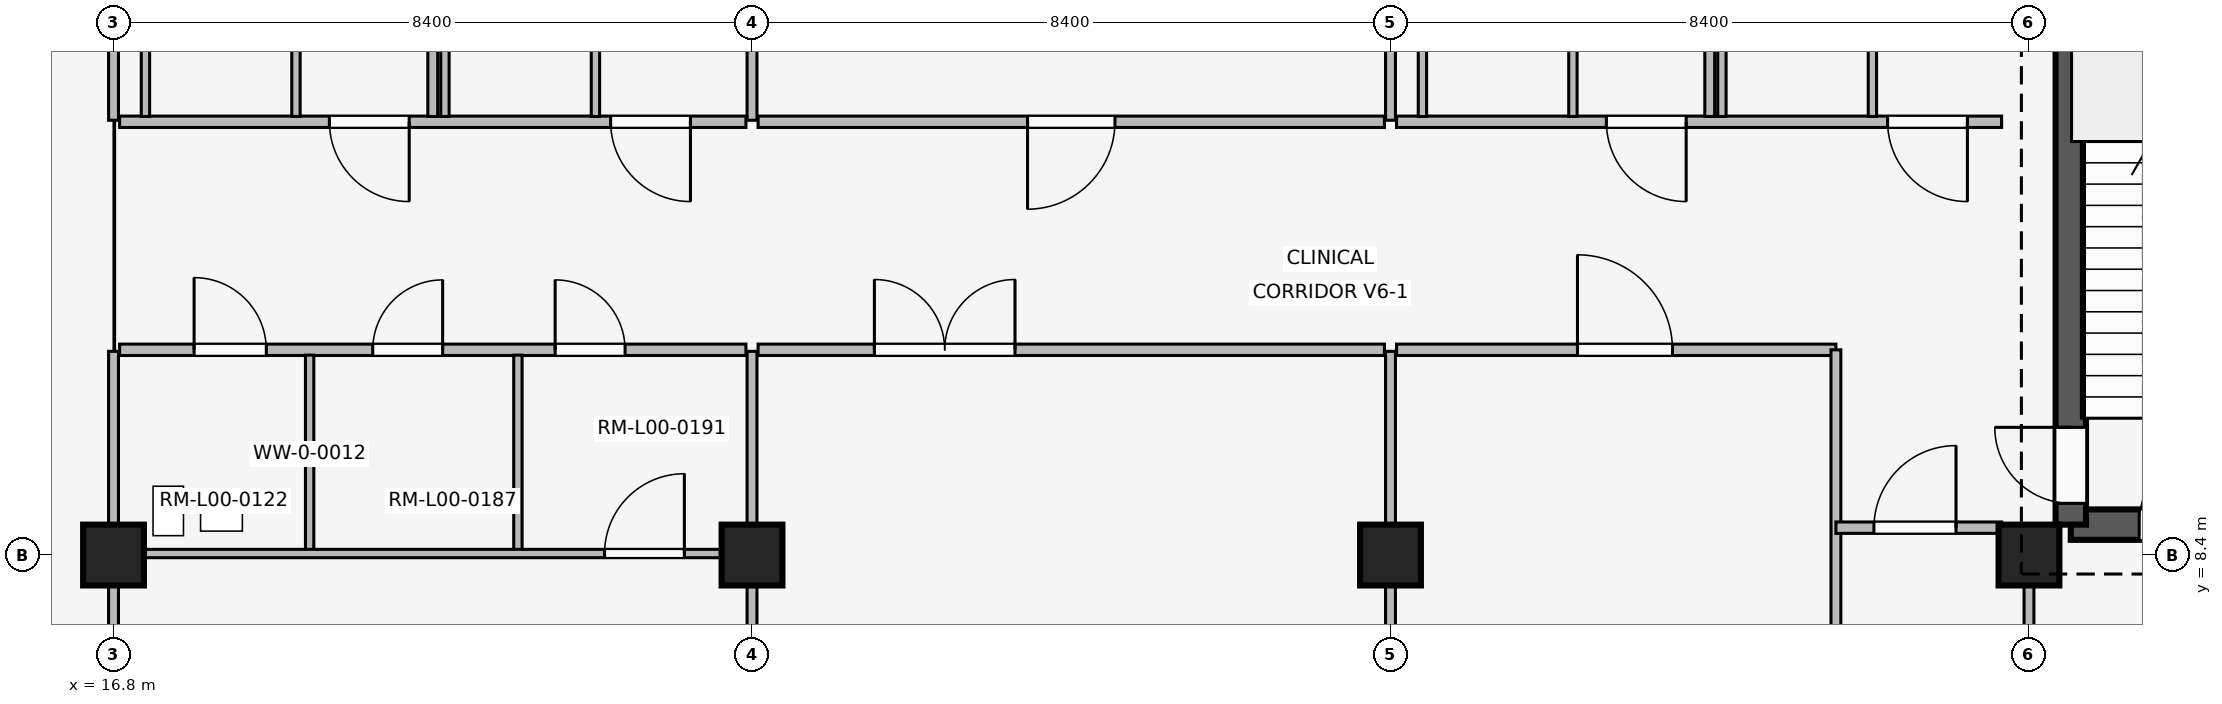
"""IFC4 building model, lengths in metres.
Left out: names, types, materials, properties, quantities, classifications, styles, units other than length and angle.
Written with IfcOpenShell. Run it as: python <this file> out.ifc"""

import sys

from ifc_helpers import new_model, si_unit, direction, frame, frame_2d, origin, origin_2d, place, context, subcontext, project, spatial, rectangle, extrude, element, fill, save


model = new_model("IFC4")
c1 = context("Model", 3, precision=1e-05, world=origin(), true_north=direction((0.0, 1.0)))
c2 = subcontext(c1, "Body", "Model", "MODEL_VIEW")
j1 = project(units=[si_unit("LENGTHUNIT", "METRE"), si_unit("PLANEANGLEUNIT", "RADIAN")], contexts=[c1])
p1 = place(None, origin())
s1 = spatial("IfcSite", under=j1, at=p1, CompositionType="ELEMENT")
p2 = place(p1, origin())
s2 = spatial("IfcBuilding", under=s1, at=p2, CompositionType="ELEMENT")
p3 = place(p2, origin())
s3 = spatial("IfcBuildingStorey", under=s2, at=p3, CompositionType="ELEMENT", Elevation=0.0)
for number, where, z_axis, x_axis in (
    (1, (16.8, 8.4, 0.0), (0.0, 0.0, 1.0), (1.0, 0.0, 0.0)),
    (2, (25.2, 8.4, 0.0), (0.0, 0.0, 1.0), (1.0, 0.0, 0.0)),
    (3, (33.6, 8.4, 0.0), (0.0, 0.0, 1.0), (1.0, 0.0, 0.0)),
    (4, (42.0, 8.4, 0.0), (0.0, 0.0, 1.0), (1.0, 0.0, 0.0)),
):
    element("IfcColumn", number, at=place(p3, frame(where, z_axis=z_axis, x_axis=x_axis)), inside=s3, PredefinedType="COLUMN", context=c2, shape_type="SweptSolid", body=[
        extrude(rectangle(XDim=0.8, YDim=0.8, at=origin_2d()), origin(), (0.0, 0.0, 1.0), 4.8),
    ])
p4 = place(p3, frame((42.55, 8.8, 0.0), z_axis=(0.0, 0.0, 1.0), x_axis=(1.0, 0.0, 0.0)))
e5 = element("IfcWall", 5, at=p4, inside=s3, PredefinedType="SHEAR", context=c2, shape_type="SweptSolid", body=[
    extrude(rectangle(XDim=7.5, YDim=0.4, at=frame_2d((3.75, 0.0))), origin(), (0.0, 0.0, 1.0), 4.52),
])
p5 = place(p4, frame((4.85, 0.0, 0.0)))
e6 = element("IfcOpeningElement", 6, at=p5, cuts=e5, PredefinedType="OPENING", context=c2, shape_type="SweptSolid", body=[
    extrude(rectangle(XDim=1.2, YDim=2.2, at=frame_2d((0.6, 1.1))), frame((0.0, 0.21, 0.0), z_axis=(0.0, -1.0, 0.0), x_axis=(1.0, 0.0, 0.0)), (0.0, 0.0, 1.0), 0.42),
])
p6 = place(p4, frame((0.9, 0.0, 0.0)))
e7 = element("IfcOpeningElement", 7, at=p6, cuts=e5, PredefinedType="OPENING", context=c2, shape_type="SweptSolid", body=[
    extrude(rectangle(XDim=1.2, YDim=2.2, at=frame_2d((0.6, 1.1))), frame((0.0, 0.21, 0.0), z_axis=(0.0, -1.0, 0.0), x_axis=(1.0, 0.0, 0.0)), (0.0, 0.0, 1.0), 0.42),
])
p7 = place(p3, frame((42.55, 8.8, 0.0), z_axis=(0.0, 0.0, 1.0), x_axis=(0.0, 1.0, 0.0)))
e8 = element("IfcWall", 8, at=p7, inside=s3, PredefinedType="SHEAR", context=c2, shape_type="SweptSolid", body=[
    extrude(rectangle(XDim=7.55, YDim=0.4, at=frame_2d((3.775, 0.0))), origin(), (0.0, 0.0, 1.0), 4.52),
])
p8 = place(p7, frame((0.28, 0.0, 0.0)))
e9 = element("IfcOpeningElement", 9, at=p8, cuts=e8, PredefinedType="OPENING", context=c2, shape_type="SweptSolid", body=[
    extrude(rectangle(XDim=1.0, YDim=2.15, at=frame_2d((0.5, 1.075))), frame((0.0, 0.21, 0.0), z_axis=(0.0, -1.0, 0.0), x_axis=(1.0, 0.0, 0.0)), (0.0, 0.0, 1.0), 0.42),
])
p9 = place(p3, frame((16.8, 0.14, 0.0), z_axis=(0.0, 0.0, 1.0), x_axis=(0.0, 1.0, 0.0)))
e10 = element("IfcWall", 10, at=p9, inside=s3, PredefinedType="PARTITIONING", context=c2, shape_type="SweptSolid", body=[
    extrude(rectangle(XDim=10.94, YDim=0.13, at=frame_2d((5.47, 0.0))), origin(), (0.0, 0.0, 1.0), 3.8),
])
p10 = place(p3, frame((16.8, 14.12, 0.0), z_axis=(0.0, 0.0, 1.0), x_axis=(0.0, 1.0, 0.0)))
e11 = element("IfcWall", 11, at=p10, inside=s3, PredefinedType="PARTITIONING", context=c2, shape_type="SweptSolid", body=[
    extrude(rectangle(XDim=10.94, YDim=0.13, at=frame_2d((5.47, 0.0))), origin(), (0.0, 0.0, 1.0), 3.8),
])
p11 = place(p3, frame((16.88, 11.1, 0.0), z_axis=(0.0, 0.0, 1.0), x_axis=(1.0, 0.0, 0.0)))
e12 = element("IfcWall", 12, at=p11, inside=s3, PredefinedType="PARTITIONING", context=c2, shape_type="SweptSolid", body=[
    extrude(rectangle(XDim=8.24, YDim=0.15, at=frame_2d((4.12, 0.0))), origin(), (0.0, 0.0, 1.0), 3.8),
])
p12 = place(p11, frame((0.98, 0.0, 0.0)))
e13 = element("IfcOpeningElement", 13, at=p12, cuts=e12, PredefinedType="OPENING", context=c2, shape_type="SweptSolid", body=[
    extrude(rectangle(XDim=0.95, YDim=2.15, at=frame_2d((0.475, 1.075))), frame((0.0, 0.085, 0.0), z_axis=(0.0, -1.0, 0.0), x_axis=(1.0, 0.0, 0.0)), (0.0, 0.0, 1.0), 0.17),
])
p13 = place(p11, frame((3.33, 0.0, 0.0)))
e14 = element("IfcOpeningElement", 14, at=p13, cuts=e12, PredefinedType="OPENING", context=c2, shape_type="SweptSolid", body=[
    extrude(rectangle(XDim=0.92, YDim=2.1, at=frame_2d((0.46, 1.05))), frame((0.0, 0.085, 0.0), z_axis=(0.0, -1.0, 0.0), x_axis=(1.0, 0.0, 0.0)), (0.0, 0.0, 1.0), 0.17),
])
p14 = place(p11, frame((5.73, 0.0, 0.0)))
e15 = element("IfcOpeningElement", 15, at=p14, cuts=e12, PredefinedType="OPENING", context=c2, shape_type="SweptSolid", body=[
    extrude(rectangle(XDim=0.92, YDim=2.1, at=frame_2d((0.46, 1.05))), frame((0.0, 0.085, 0.0), z_axis=(0.0, -1.0, 0.0), x_axis=(1.0, 0.0, 0.0)), (0.0, 0.0, 1.0), 0.17),
])
for number, where, z_axis, x_axis in (
    (16, (19.38, 8.44, 0.0), (0.0, 0.0, 1.0), (0.0, 1.0, 0.0)),
    (17, (22.12, 8.44, 0.0), (0.0, 0.0, 1.0), (0.0, 1.0, 0.0)),
):
    element("IfcWall", number, at=place(p3, frame(where, z_axis=z_axis, x_axis=x_axis)), inside=s3, PredefinedType="PARTITIONING", context=c2, shape_type="SweptSolid", body=[
        extrude(rectangle(XDim=2.59, YDim=0.11, at=frame_2d((1.295, 0.0))), origin(), (0.0, 0.0, 1.0), 3.8),
    ])
p15 = place(p3, frame((16.88, 8.42, 0.0), z_axis=(0.0, 0.0, 1.0), x_axis=(1.0, 0.0, 0.0)))
e18 = element("IfcWall", 18, at=p15, inside=s3, PredefinedType="PARTITIONING", context=c2, shape_type="SweptSolid", body=[
    extrude(rectangle(XDim=8.24, YDim=0.11, at=frame_2d((4.12, 0.0))), origin(), (0.0, 0.0, 1.0), 3.8),
])
p16 = place(p15, frame((6.38, 0.0, 0.0)))
e19 = element("IfcOpeningElement", 19, at=p16, cuts=e18, PredefinedType="OPENING", context=c2, shape_type="SweptSolid", body=[
    extrude(rectangle(XDim=1.05, YDim=2.2, at=frame_2d((0.525, 1.1))), frame((0.0, 0.065, 0.0), z_axis=(0.0, -1.0, 0.0), x_axis=(1.0, 0.0, 0.0)), (0.0, 0.0, 1.0), 0.13),
])
p17 = place(p3, frame((25.12, 14.1, 0.0), z_axis=(0.0, 0.0, 1.0), x_axis=(-1.0, 0.0, 0.0)))
e20 = element("IfcWall", 20, at=p17, inside=s3, PredefinedType="PARTITIONING", context=c2, shape_type="SweptSolid", body=[
    extrude(rectangle(XDim=8.24, YDim=0.15, at=frame_2d((4.12, 0.0))), origin(), (0.0, 0.0, 1.0), 3.8),
])
p18 = place(p17, frame((0.73, 0.0, 0.0)))
e21 = element("IfcOpeningElement", 21, at=p18, cuts=e20, PredefinedType="OPENING", context=c2, shape_type="SweptSolid", body=[
    extrude(rectangle(XDim=1.05, YDim=2.2, at=frame_2d((0.525, 1.1))), frame((0.0, 0.085, 0.0), z_axis=(0.0, -1.0, 0.0), x_axis=(1.0, 0.0, 0.0)), (0.0, 0.0, 1.0), 0.17),
])
p19 = place(p17, frame((4.43, 0.0, 0.0)))
e22 = element("IfcOpeningElement", 22, at=p19, cuts=e20, PredefinedType="OPENING", context=c2, shape_type="SweptSolid", body=[
    extrude(rectangle(XDim=1.05, YDim=2.2, at=frame_2d((0.525, 1.1))), frame((0.0, 0.085, 0.0), z_axis=(0.0, -1.0, 0.0), x_axis=(1.0, 0.0, 0.0)), (0.0, 0.0, 1.0), 0.17),
])
p20 = place(p3, frame((21.0, 14.17, 0.0), z_axis=(0.0, 0.0, 1.0), x_axis=(0.0, 1.0, 0.0)))
e23 = element("IfcWall", 23, at=p20, inside=s3, PredefinedType="PARTITIONING", context=c2, shape_type="SweptSolid", body=[
    extrude(rectangle(XDim=10.93, YDim=0.13, at=frame_2d((5.465, 0.0))), origin(), (0.0, 0.0, 1.0), 3.8),
])
for number, where, z_axis, x_axis in (
    (24, (17.22, 14.17, 0.0), (0.0, 0.0, 1.0), (0.0, 1.0, 0.0)),
    (25, (19.2, 14.17, 0.0), (0.0, 0.0, 1.0), (0.0, 1.0, 0.0)),
    (26, (21.16, 14.17, 0.0), (0.0, 0.0, 1.0), (0.0, 1.0, 0.0)),
    (27, (23.14, 14.17, 0.0), (0.0, 0.0, 1.0), (0.0, 1.0, 0.0)),
):
    element("IfcWall", number, at=place(p3, frame(where, z_axis=z_axis, x_axis=x_axis)), inside=s3, PredefinedType="PARTITIONING", context=c2, shape_type="SweptSolid", body=[
        extrude(rectangle(XDim=2.61, YDim=0.11, at=frame_2d((1.305, 0.0))), origin(), (0.0, 0.0, 1.0), 3.8),
    ])
p21 = place(p3, frame((25.2, 0.14, 0.0), z_axis=(0.0, 0.0, 1.0), x_axis=(0.0, 1.0, 0.0)))
e28 = element("IfcWall", 28, at=p21, inside=s3, PredefinedType="PARTITIONING", context=c2, shape_type="SweptSolid", body=[
    extrude(rectangle(XDim=10.94, YDim=0.13, at=frame_2d((5.47, 0.0))), origin(), (0.0, 0.0, 1.0), 3.8),
])
p22 = place(p3, frame((25.2, 14.12, 0.0), z_axis=(0.0, 0.0, 1.0), x_axis=(0.0, 1.0, 0.0)))
e29 = element("IfcWall", 29, at=p22, inside=s3, PredefinedType="PARTITIONING", context=c2, shape_type="SweptSolid", body=[
    extrude(rectangle(XDim=10.94, YDim=0.13, at=frame_2d((5.47, 0.0))), origin(), (0.0, 0.0, 1.0), 3.8),
])
p23 = place(p3, frame((25.28, 11.1, 0.0), z_axis=(0.0, 0.0, 1.0), x_axis=(1.0, 0.0, 0.0)))
e30 = element("IfcWall", 30, at=p23, inside=s3, PredefinedType="PARTITIONING", context=c2, shape_type="SweptSolid", body=[
    extrude(rectangle(XDim=8.24, YDim=0.15, at=frame_2d((4.12, 0.0))), origin(), (0.0, 0.0, 1.0), 3.8),
])
p24 = place(p23, frame((1.53, 0.0, 0.0)))
e31 = element("IfcOpeningElement", 31, at=p24, cuts=e30, PredefinedType="OPENING", context=c2, shape_type="SweptSolid", body=[
    extrude(rectangle(XDim=1.85, YDim=2.3, at=frame_2d((0.925, 1.15))), frame((0.0, 0.085, 0.0), z_axis=(0.0, -1.0, 0.0), x_axis=(1.0, 0.0, 0.0)), (0.0, 0.0, 1.0), 0.17),
])
p25 = place(p3, frame((33.52, 14.1, 0.0), z_axis=(0.0, 0.0, 1.0), x_axis=(-1.0, 0.0, 0.0)))
e32 = element("IfcWall", 32, at=p25, inside=s3, PredefinedType="PARTITIONING", context=c2, shape_type="SweptSolid", body=[
    extrude(rectangle(XDim=8.24, YDim=0.15, at=frame_2d((4.12, 0.0))), origin(), (0.0, 0.0, 1.0), 3.8),
])
p26 = place(p25, frame((3.545, 0.0, 0.0)))
e33 = element("IfcOpeningElement", 33, at=p26, cuts=e32, PredefinedType="OPENING", context=c2, shape_type="SweptSolid", body=[
    extrude(rectangle(XDim=1.15, YDim=2.2, at=frame_2d((0.575, 1.1))), frame((0.0, 0.085, 0.0), z_axis=(0.0, -1.0, 0.0), x_axis=(1.0, 0.0, 0.0)), (0.0, 0.0, 1.0), 0.17),
])
p27 = place(p3, frame((33.6, 0.14, 0.0), z_axis=(0.0, 0.0, 1.0), x_axis=(0.0, 1.0, 0.0)))
e34 = element("IfcWall", 34, at=p27, inside=s3, PredefinedType="PARTITIONING", context=c2, shape_type="SweptSolid", body=[
    extrude(rectangle(XDim=10.94, YDim=0.13, at=frame_2d((5.47, 0.0))), origin(), (0.0, 0.0, 1.0), 3.8),
])
p28 = place(p3, frame((33.6, 14.12, 0.0), z_axis=(0.0, 0.0, 1.0), x_axis=(0.0, 1.0, 0.0)))
e35 = element("IfcWall", 35, at=p28, inside=s3, PredefinedType="PARTITIONING", context=c2, shape_type="SweptSolid", body=[
    extrude(rectangle(XDim=10.94, YDim=0.13, at=frame_2d((5.47, 0.0))), origin(), (0.0, 0.0, 1.0), 3.8),
])
p29 = place(p3, frame((33.68, 11.1, 0.0), z_axis=(0.0, 0.0, 1.0), x_axis=(1.0, 0.0, 0.0)))
e36 = element("IfcWall", 36, at=p29, inside=s3, PredefinedType="PARTITIONING", context=c2, shape_type="SweptSolid", body=[
    extrude(rectangle(XDim=5.78, YDim=0.15, at=frame_2d((2.89, 0.0))), origin(), (0.0, 0.0, 1.0), 3.8),
])
p30 = place(p29, frame((2.38, 0.0, 0.0)))
e37 = element("IfcOpeningElement", 37, at=p30, cuts=e36, PredefinedType="OPENING", context=c2, shape_type="SweptSolid", body=[
    extrude(rectangle(XDim=1.25, YDim=2.2, at=frame_2d((0.625, 1.1))), frame((0.0, 0.085, 0.0), z_axis=(0.0, -1.0, 0.0), x_axis=(1.0, 0.0, 0.0)), (0.0, 0.0, 1.0), 0.17),
])
p31 = place(p3, frame((39.46, 0.16, 0.0), z_axis=(0.0, 0.0, 1.0), x_axis=(0.0, 1.0, 0.0)))
e38 = element("IfcWall", 38, at=p31, inside=s3, PredefinedType="PARTITIONING", context=c2, shape_type="SweptSolid", body=[
    extrude(rectangle(XDim=10.94, YDim=0.13, at=frame_2d((5.47, 0.0))), origin(), (0.0, 0.0, 1.0), 3.8),
])
p32 = place(p3, frame((39.46, 8.76, 0.0), z_axis=(0.0, 0.0, 1.0), x_axis=(1.0, 0.0, 0.0)))
e39 = element("IfcWall", 39, at=p32, inside=s3, PredefinedType="PARTITIONING", context=c2, shape_type="SweptSolid", body=[
    extrude(rectangle(XDim=2.18, YDim=0.15, at=frame_2d((1.09, 0.0))), origin(), (0.0, 0.0, 1.0), 3.8),
])
p33 = place(p32, frame((0.5, 0.0, 0.0)))
e40 = element("IfcOpeningElement", 40, at=p33, cuts=e39, PredefinedType="OPENING", context=c2, shape_type="SweptSolid", body=[
    extrude(rectangle(XDim=1.08, YDim=2.15, at=frame_2d((0.54, 1.075))), frame((0.0, 0.085, 0.0), z_axis=(0.0, -1.0, 0.0), x_axis=(1.0, 0.0, 0.0)), (0.0, 0.0, 1.0), 0.17),
])
p34 = place(p3, frame((41.64, 14.1, 0.0), z_axis=(0.0, 0.0, 1.0), x_axis=(-1.0, 0.0, 0.0)))
e41 = element("IfcWall", 41, at=p34, inside=s3, PredefinedType="PARTITIONING", context=c2, shape_type="SweptSolid", body=[
    extrude(rectangle(XDim=7.96, YDim=0.15, at=frame_2d((3.98, 0.0))), origin(), (0.0, 0.0, 1.0), 3.8),
])
p35 = place(p34, frame((0.45, 0.0, 0.0)))
e42 = element("IfcOpeningElement", 42, at=p35, cuts=e41, PredefinedType="OPENING", context=c2, shape_type="SweptSolid", body=[
    extrude(rectangle(XDim=1.05, YDim=2.2, at=frame_2d((0.525, 1.1))), frame((0.0, 0.085, 0.0), z_axis=(0.0, -1.0, 0.0), x_axis=(1.0, 0.0, 0.0)), (0.0, 0.0, 1.0), 0.17),
])
p36 = place(p34, frame((4.15, 0.0, 0.0)))
e43 = element("IfcOpeningElement", 43, at=p36, cuts=e41, PredefinedType="OPENING", context=c2, shape_type="SweptSolid", body=[
    extrude(rectangle(XDim=1.05, YDim=2.2, at=frame_2d((0.525, 1.1))), frame((0.0, 0.085, 0.0), z_axis=(0.0, -1.0, 0.0), x_axis=(1.0, 0.0, 0.0)), (0.0, 0.0, 1.0), 0.17),
])
p37 = place(p3, frame((37.8, 14.17, 0.0), z_axis=(0.0, 0.0, 1.0), x_axis=(0.0, 1.0, 0.0)))
e44 = element("IfcWall", 44, at=p37, inside=s3, PredefinedType="PARTITIONING", context=c2, shape_type="SweptSolid", body=[
    extrude(rectangle(XDim=10.93, YDim=0.13, at=frame_2d((5.465, 0.0))), origin(), (0.0, 0.0, 1.0), 3.8),
])
for number, where, z_axis, x_axis in (
    (45, (34.02, 14.17, 0.0), (0.0, 0.0, 1.0), (0.0, 1.0, 0.0)),
    (46, (36.0, 14.17, 0.0), (0.0, 0.0, 1.0), (0.0, 1.0, 0.0)),
    (47, (37.96, 14.17, 0.0), (0.0, 0.0, 1.0), (0.0, 1.0, 0.0)),
    (48, (39.94, 14.17, 0.0), (0.0, 0.0, 1.0), (0.0, 1.0, 0.0)),
):
    element("IfcWall", number, at=place(p3, frame(where, z_axis=z_axis, x_axis=x_axis)), inside=s3, PredefinedType="PARTITIONING", context=c2, shape_type="SweptSolid", body=[
        extrude(rectangle(XDim=2.61, YDim=0.11, at=frame_2d((1.305, 0.0))), origin(), (0.0, 0.0, 1.0), 3.8),
    ])
p38 = place(p3, frame((42.0, 0.14, 0.0), z_axis=(0.0, 0.0, 1.0), x_axis=(0.0, 1.0, 0.0)))
e49 = element("IfcWall", 49, at=p38, inside=s3, PredefinedType="PARTITIONING", context=c2, shape_type="SweptSolid", body=[
    extrude(rectangle(XDim=8.21, YDim=0.13, at=frame_2d((4.105, 0.0))), origin(), (0.0, 0.0, 1.0), 3.8),
])
p39 = place(p38, frame((3.64, 0.0, 0.0)))
e50 = element("IfcOpeningElement", 50, at=p39, cuts=e49, PredefinedType="OPENING", context=c2, shape_type="SweptSolid", body=[
    extrude(rectangle(XDim=1.08, YDim=2.15, at=frame_2d((0.54, 1.075))), frame((0.0, 0.075, 0.0), z_axis=(0.0, -1.0, 0.0), x_axis=(1.0, 0.0, 0.0)), (0.0, 0.0, 1.0), 0.15),
])
p40 = place(p8, origin())
e51 = element("IfcDoor", 51, at=p40, inside=s3, OperationType="SINGLE_SWING_RIGHT", PredefinedType="DOOR", context=c2, shape_type="SweptSolid", body=[
    extrude(rectangle(XDim=1.0, YDim=2.15, at=frame_2d((0.5, 1.075))), frame((0.0, 0.025, 0.0), z_axis=(0.0, -1.0, 0.0), x_axis=(1.0, 0.0, 0.0)), (0.0, 0.0, 1.0), 0.05),
])
fill(e9, e51)
p41 = place(p6, origin())
e52 = element("IfcDoor", 52, at=p41, inside=s3, OperationType="SINGLE_SWING_RIGHT", PredefinedType="DOOR", context=c2, shape_type="SweptSolid", body=[
    extrude(rectangle(XDim=1.2, YDim=2.2, at=frame_2d((0.6, 1.1))), frame((0.0, 0.025, 0.0), z_axis=(0.0, -1.0, 0.0), x_axis=(1.0, 0.0, 0.0)), (0.0, 0.0, 1.0), 0.05),
])
fill(e7, e52)
p42 = place(p12, origin())
e53 = element("IfcDoor", 53, at=p42, inside=s3, OperationType="SINGLE_SWING_LEFT", PredefinedType="DOOR", context=c2, shape_type="SweptSolid", body=[
    extrude(rectangle(XDim=0.95, YDim=2.15, at=frame_2d((0.475, 1.075))), frame((0.0, 0.025, 0.0), z_axis=(0.0, -1.0, 0.0), x_axis=(1.0, 0.0, 0.0)), (0.0, 0.0, 1.0), 0.05),
])
fill(e13, e53)
p43 = place(p13, origin())
e54 = element("IfcDoor", 54, at=p43, inside=s3, OperationType="SINGLE_SWING_RIGHT", PredefinedType="DOOR", context=c2, shape_type="SweptSolid", body=[
    extrude(rectangle(XDim=0.92, YDim=2.1, at=frame_2d((0.46, 1.05))), frame((0.0, 0.025, 0.0), z_axis=(0.0, -1.0, 0.0), x_axis=(1.0, 0.0, 0.0)), (0.0, 0.0, 1.0), 0.05),
])
fill(e14, e54)
p44 = place(p14, origin())
e55 = element("IfcDoor", 55, at=p44, inside=s3, OperationType="SINGLE_SWING_LEFT", PredefinedType="DOOR", context=c2, shape_type="SweptSolid", body=[
    extrude(rectangle(XDim=0.92, YDim=2.1, at=frame_2d((0.46, 1.05))), frame((0.0, 0.025, 0.0), z_axis=(0.0, -1.0, 0.0), x_axis=(1.0, 0.0, 0.0)), (0.0, 0.0, 1.0), 0.05),
])
fill(e15, e55)
p45 = place(p16, origin())
e56 = element("IfcDoor", 56, at=p45, inside=s3, OperationType="SINGLE_SWING_RIGHT", PredefinedType="DOOR", context=c2, shape_type="SweptSolid", body=[
    extrude(rectangle(XDim=1.05, YDim=2.2, at=frame_2d((0.525, 1.1))), frame((0.0, 0.025, 0.0), z_axis=(0.0, -1.0, 0.0), x_axis=(1.0, 0.0, 0.0)), (0.0, 0.0, 1.0), 0.05),
])
fill(e19, e56)
p46 = place(p18, origin())
e57 = element("IfcDoor", 57, at=p46, inside=s3, OperationType="SINGLE_SWING_LEFT", PredefinedType="DOOR", context=c2, shape_type="SweptSolid", body=[
    extrude(rectangle(XDim=1.05, YDim=2.2, at=frame_2d((0.525, 1.1))), frame((0.0, 0.025, 0.0), z_axis=(0.0, -1.0, 0.0), x_axis=(1.0, 0.0, 0.0)), (0.0, 0.0, 1.0), 0.05),
])
fill(e21, e57)
p47 = place(p19, origin())
e58 = element("IfcDoor", 58, at=p47, inside=s3, OperationType="SINGLE_SWING_LEFT", PredefinedType="DOOR", context=c2, shape_type="SweptSolid", body=[
    extrude(rectangle(XDim=1.05, YDim=2.2, at=frame_2d((0.525, 1.1))), frame((0.0, 0.025, 0.0), z_axis=(0.0, -1.0, 0.0), x_axis=(1.0, 0.0, 0.0)), (0.0, 0.0, 1.0), 0.05),
])
fill(e22, e58)
p48 = place(p24, origin())
e59 = element("IfcDoor", 59, at=p48, inside=s3, OperationType="DOUBLE_SWING_LEFT", PredefinedType="DOOR", context=c2, shape_type="SweptSolid", body=[
    extrude(rectangle(XDim=1.85, YDim=2.3, at=frame_2d((0.925, 1.15))), frame((0.0, 0.025, 0.0), z_axis=(0.0, -1.0, 0.0), x_axis=(1.0, 0.0, 0.0)), (0.0, 0.0, 1.0), 0.05),
])
fill(e31, e59)
p49 = place(p26, origin())
e60 = element("IfcDoor", 60, at=p49, inside=s3, OperationType="SINGLE_SWING_RIGHT", PredefinedType="DOOR", context=c2, shape_type="SweptSolid", body=[
    extrude(rectangle(XDim=1.15, YDim=2.2, at=frame_2d((0.575, 1.1))), frame((0.0, 0.025, 0.0), z_axis=(0.0, -1.0, 0.0), x_axis=(1.0, 0.0, 0.0)), (0.0, 0.0, 1.0), 0.05),
])
fill(e33, e60)
p50 = place(p30, origin())
e61 = element("IfcDoor", 61, at=p50, inside=s3, OperationType="SINGLE_SWING_LEFT", PredefinedType="DOOR", context=c2, shape_type="SweptSolid", body=[
    extrude(rectangle(XDim=1.25, YDim=2.2, at=frame_2d((0.625, 1.1))), frame((0.0, 0.025, 0.0), z_axis=(0.0, -1.0, 0.0), x_axis=(1.0, 0.0, 0.0)), (0.0, 0.0, 1.0), 0.05),
])
fill(e37, e61)
p51 = place(p33, origin())
e62 = element("IfcDoor", 62, at=p51, inside=s3, OperationType="SINGLE_SWING_RIGHT", PredefinedType="DOOR", context=c2, shape_type="SweptSolid", body=[
    extrude(rectangle(XDim=1.08, YDim=2.15, at=frame_2d((0.54, 1.075))), frame((0.0, 0.025, 0.0), z_axis=(0.0, -1.0, 0.0), x_axis=(1.0, 0.0, 0.0)), (0.0, 0.0, 1.0), 0.05),
])
fill(e40, e62)
p52 = place(p35, origin())
e63 = element("IfcDoor", 63, at=p52, inside=s3, OperationType="SINGLE_SWING_LEFT", PredefinedType="DOOR", context=c2, shape_type="SweptSolid", body=[
    extrude(rectangle(XDim=1.05, YDim=2.2, at=frame_2d((0.525, 1.1))), frame((0.0, 0.025, 0.0), z_axis=(0.0, -1.0, 0.0), x_axis=(1.0, 0.0, 0.0)), (0.0, 0.0, 1.0), 0.05),
])
fill(e42, e63)
p53 = place(p36, origin())
e64 = element("IfcDoor", 64, at=p53, inside=s3, OperationType="SINGLE_SWING_LEFT", PredefinedType="DOOR", context=c2, shape_type="SweptSolid", body=[
    extrude(rectangle(XDim=1.05, YDim=2.2, at=frame_2d((0.525, 1.1))), frame((0.0, 0.025, 0.0), z_axis=(0.0, -1.0, 0.0), x_axis=(1.0, 0.0, 0.0)), (0.0, 0.0, 1.0), 0.05),
])
fill(e43, e64)
save(model, sys.argv[1])
